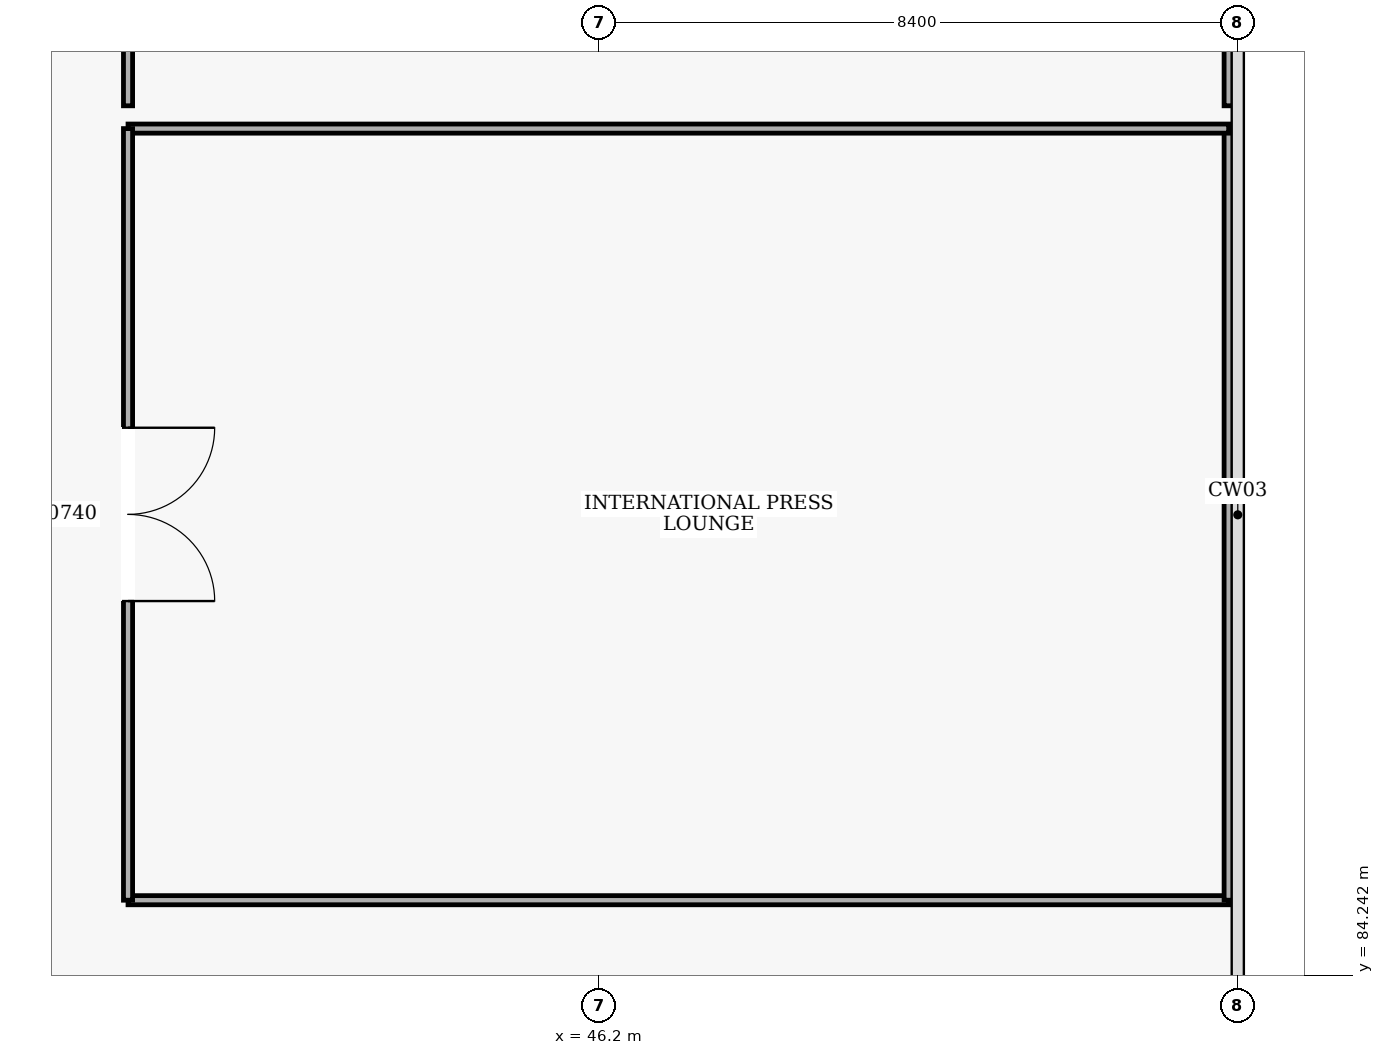
"""IFC4 building model, lengths in metres.
Left out: names, types, materials, properties, quantities, classifications, styles, units other than length and angle.
Written with IfcOpenShell. Run it as: python <this file> out.ifc"""

import sys

from ifc_helpers import new_model, si_unit, direction, frame, frame_2d, origin, place, context, subcontext, project, spatial, rectangle, extrude, element, fill, save


model = new_model("IFC4")
c1 = context("Model", 3, precision=1e-05, world=origin(), true_north=direction((0.0, 1.0)))
c2 = subcontext(c1, "Body", "Model", "MODEL_VIEW")
j1 = project(units=[si_unit("LENGTHUNIT", "METRE"), si_unit("PLANEANGLEUNIT", "RADIAN")], contexts=[c1])
p1 = place(None, origin())
s1 = spatial("IfcSite", under=j1, at=p1, CompositionType="ELEMENT")
p2 = place(p1, origin())
s2 = spatial("IfcBuilding", under=s1, at=p2, CompositionType="ELEMENT")
p3 = place(p2, frame((0.0, 0.0, 19.8)))
s3 = spatial("IfcBuildingStorey", under=s2, at=p3, CompositionType="ELEMENT", Elevation=19.8)
p4 = place(p3, frame((40.0, 85.23, 0.0), z_axis=(0.0, 0.0, 1.0), x_axis=(1.0, 0.0, 0.0)))
e1 = element("IfcWall", 1, at=p4, inside=s3, PredefinedType="PARTITIONING", context=c2, shape_type="SweptSolid", body=[
    extrude(rectangle(XDim=14.48, YDim=0.12, at=frame_2d((7.24, 0.0))), origin(), (0.0, 0.0, 1.0), 4.5),
])
p5 = place(p3, frame((54.48, 85.23, 0.0), z_axis=(0.0, 0.0, 1.0), x_axis=(0.0, 1.0, 0.0)))
e2 = element("IfcWall", 2, at=p5, inside=s3, PredefinedType="PARTITIONING", context=c2, shape_type="SweptSolid", body=[
    extrude(rectangle(XDim=10.151, YDim=0.12, at=frame_2d((5.076, 0.0))), origin(), (0.0, 0.0, 1.0), 4.5),
])
p6 = place(p3, frame((54.48, 95.381, 0.0), z_axis=(0.0, 0.0, 1.0), x_axis=(-1.0, 0.0, 0.0)))
e3 = element("IfcWall", 3, at=p6, inside=s3, PredefinedType="PARTITIONING", context=c2, shape_type="SweptSolid", body=[
    extrude(rectangle(XDim=14.48, YDim=0.12, at=frame_2d((7.24, 0.0))), origin(), (0.0, 0.0, 1.0), 4.5),
])
p7 = place(p3, frame((40.0, 95.381, 0.0), z_axis=(0.0, 0.0, 1.0), x_axis=(0.0, -1.0, 0.0)))
e4 = element("IfcWall", 4, at=p7, inside=s3, PredefinedType="PARTITIONING", context=c2, shape_type="SweptSolid", body=[
    extrude(rectangle(XDim=10.151, YDim=0.12, at=frame_2d((5.076, 0.0))), origin(), (0.0, 0.0, 1.0), 4.5),
])
p8 = place(p7, frame((3.936, 0.0, 0.0)))
e5 = element("IfcOpeningElement", 5, at=p8, cuts=e4, PredefinedType="OPENING", context=c2, shape_type="SweptSolid", body=[
    extrude(rectangle(XDim=2.28, YDim=2.4, at=frame_2d((1.14, 1.2))), frame((0.0, 0.07, 0.0), z_axis=(0.0, -1.0, 0.0), x_axis=(1.0, 0.0, 0.0)), (0.0, 0.0, 1.0), 0.14),
])
p9 = place(p3, frame((54.48, 95.681, 0.0), z_axis=(0.0, 0.0, 1.0), x_axis=(0.0, 1.0, 0.0)))
e6 = element("IfcWall", 6, at=p9, inside=s3, PredefinedType="PARTITIONING", context=c2, shape_type="SweptSolid", body=[
    extrude(rectangle(XDim=15.369, YDim=0.12, at=frame_2d((7.685, 0.0))), origin(), (0.0, 0.0, 1.0), 4.5),
])
p10 = place(p3, frame((40.0, 111.05, 0.0), z_axis=(0.0, 0.0, 1.0), x_axis=(0.0, -1.0, 0.0)))
e7 = element("IfcWall", 7, at=p10, inside=s3, PredefinedType="PARTITIONING", context=c2, shape_type="SweptSolid", body=[
    extrude(rectangle(XDim=15.369, YDim=0.12, at=frame_2d((7.685, 0.0))), origin(), (0.0, 0.0, 1.0), 4.5),
])
p11 = place(p10, frame((6.504, 0.0, 0.0)))
e8 = element("IfcOpeningElement", 8, at=p11, cuts=e7, PredefinedType="OPENING", context=c2, shape_type="SweptSolid", body=[
    extrude(rectangle(XDim=2.36, YDim=2.4, at=frame_2d((1.18, 1.2))), frame((0.0, 0.07, 0.0), z_axis=(0.0, -1.0, 0.0), x_axis=(1.0, 0.0, 0.0)), (0.0, 0.0, 1.0), 0.14),
])
p12 = place(p8, origin())
e9 = element("IfcDoor", 9, at=p12, inside=s3, OperationType="DOUBLE_DOOR_SINGLE_SWING", PredefinedType="DOOR", context=c2, shape_type="SweptSolid", body=[
    extrude(rectangle(XDim=2.28, YDim=2.4, at=frame_2d((1.14, 1.2))), frame((0.0, 0.025, 0.0), z_axis=(0.0, -1.0, 0.0), x_axis=(1.0, 0.0, 0.0)), (0.0, 0.0, 1.0), 0.05),
])
fill(e5, e9)
save(model, sys.argv[1])
